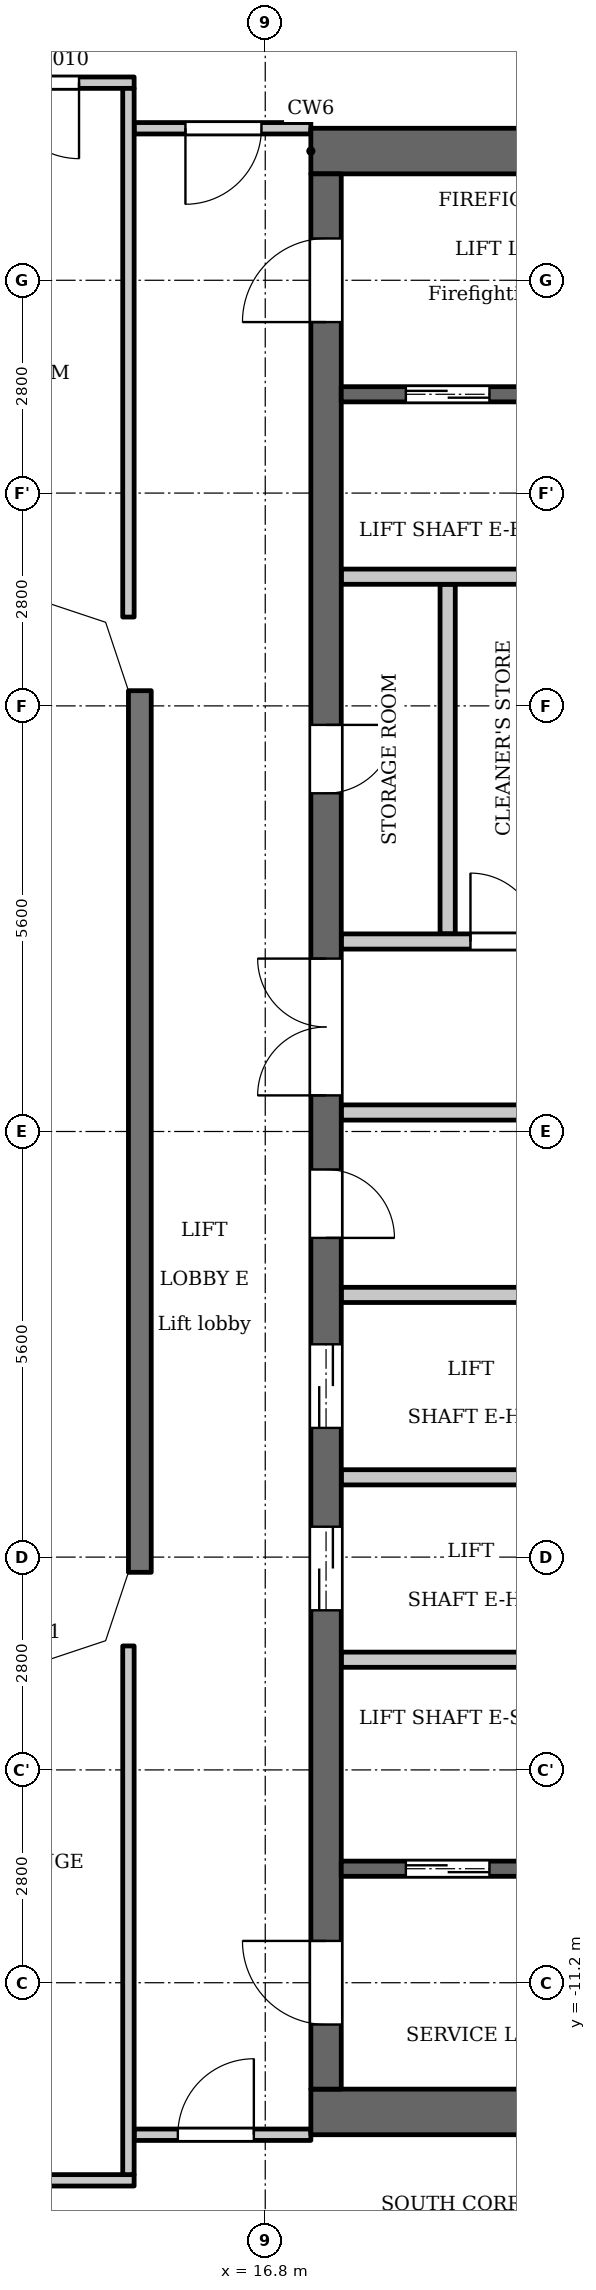
"""IFC4 building model, lengths in metres.
Left out: names, types, materials, properties, quantities, classifications, styles, units other than length and angle.
Written with IfcOpenShell. Run it as: python <this file> out.ifc"""

import sys

from ifc_helpers import new_model, si_unit, direction, frame, frame_2d, origin, place, context, subcontext, project, spatial, polyline, rectangle, outline, extrude, element, fill, save


model = new_model("IFC4")
c1 = context("Model", 3, precision=1e-05, world=origin(), true_north=direction((0.0, 1.0)))
c2 = subcontext(c1, "Body", "Model", "MODEL_VIEW")
j1 = project(units=[si_unit("LENGTHUNIT", "METRE"), si_unit("PLANEANGLEUNIT", "RADIAN")], contexts=[c1])
p1 = place(None, origin())
s1 = spatial("IfcSite", under=j1, at=p1, CompositionType="ELEMENT")
p2 = place(p1, origin())
s2 = spatial("IfcBuilding", under=s1, at=p2, CompositionType="ELEMENT")
p3 = place(p2, frame((0.0, 0.0, 252.2)))
s3 = spatial("IfcBuildingStorey", under=s2, at=p3, CompositionType="ELEMENT", Elevation=252.2)
p4 = place(p3, frame((15.15, 5.8, 0.0), z_axis=(0.0, 0.0, 1.0), x_axis=(0.0, -1.0, 0.0)))
e1 = element("IfcWall", 1, at=p4, inside=s3, PredefinedType="SOLIDWALL", context=c2, shape_type="SweptSolid", body=[
    extrude(rectangle(XDim=11.6, YDim=0.3, at=frame_2d((5.8, 0.0))), origin(), (0.0, 0.0, 1.0), 3.2),
])
for number, where, z_axis, x_axis in (
    (2, (17.4, 12.9, 0.0), (0.0, 0.0, 1.0), (1.0, 0.0, 0.0)),
    (3, (17.4, -12.9, 0.0), (0.0, 0.0, 1.0), (1.0, 0.0, 0.0)),
):
    element("IfcWall", number, at=place(p3, frame(where, z_axis=z_axis, x_axis=x_axis)), inside=s3, PredefinedType="SHEAR", context=c2, shape_type="SweptSolid", body=[
        extrude(rectangle(XDim=7.32, YDim=0.6, at=frame_2d((3.66, 0.0))), origin(), (0.0, 0.0, 1.0), 3.2),
    ])
p5 = place(p3, frame((19.2, 2.6, 0.0), z_axis=(0.0, 0.0, 1.0), x_axis=(0.0, 1.0, 0.0)))
e4 = element("IfcWall", 4, at=p5, inside=s3, PredefinedType="PARTITIONING", context=c2, shape_type="SweptSolid", body=[
    extrude(rectangle(XDim=4.6, YDim=0.2, at=frame_2d((2.3, 0.0))), origin(), (0.0, 0.0, 1.0), 3.2),
])
p6 = place(p3, frame((17.6, -12.6, 0.0), z_axis=(0.0, 0.0, 1.0), x_axis=(0.0, 1.0, 0.0)))
e5 = element("IfcWall", 5, at=p6, inside=s3, PredefinedType="SHEAR", context=c2, shape_type="SweptSolid", body=[
    extrude(rectangle(XDim=25.2, YDim=0.4, at=frame_2d((12.6, 0.0))), origin(), (0.0, 0.0, 1.0), 3.2),
])
p7 = place(p6, frame((6.3, 0.0, 0.0)))
e6 = element("IfcOpeningElement", 6, at=p7, cuts=e5, PredefinedType="OPENING", context=c2, shape_type="SweptSolid", body=[
    extrude(rectangle(XDim=1.1, YDim=2.1, at=frame_2d((0.55, 1.05))), frame((0.0, 0.21, 0.0), z_axis=(0.0, -1.0, 0.0), x_axis=(1.0, 0.0, 0.0)), (0.0, 0.0, 1.0), 0.42),
])
p8 = place(p6, frame((8.7, 0.0, 0.0)))
e7 = element("IfcOpeningElement", 7, at=p8, cuts=e5, PredefinedType="OPENING", context=c2, shape_type="SweptSolid", body=[
    extrude(rectangle(XDim=1.1, YDim=2.1, at=frame_2d((0.55, 1.05))), frame((0.0, 0.21, 0.0), z_axis=(0.0, -1.0, 0.0), x_axis=(1.0, 0.0, 0.0)), (0.0, 0.0, 1.0), 0.42),
])
p9 = place(p6, frame((11.2, 0.0, 0.0)))
e8 = element("IfcOpeningElement", 8, at=p9, cuts=e5, PredefinedType="OPENING", context=c2, shape_type="SweptSolid", body=[
    extrude(rectangle(XDim=0.9, YDim=2.1, at=frame_2d((0.45, 1.05))), frame((0.0, 0.21, 0.0), z_axis=(0.0, -1.0, 0.0), x_axis=(1.0, 0.0, 0.0)), (0.0, 0.0, 1.0), 0.42),
])
p10 = place(p6, frame((17.05, 0.0, 0.0)))
e9 = element("IfcOpeningElement", 9, at=p10, cuts=e5, PredefinedType="OPENING", context=c2, shape_type="SweptSolid", body=[
    extrude(rectangle(XDim=0.9, YDim=2.1, at=frame_2d((0.45, 1.05))), frame((0.0, 0.21, 0.0), z_axis=(0.0, -1.0, 0.0), x_axis=(1.0, 0.0, 0.0)), (0.0, 0.0, 1.0), 0.42),
])
p11 = place(p6, frame((23.25, 0.0, 0.0)))
e10 = element("IfcOpeningElement", 10, at=p11, cuts=e5, PredefinedType="OPENING", context=c2, shape_type="SweptSolid", body=[
    extrude(rectangle(XDim=1.1, YDim=2.1, at=frame_2d((0.55, 1.05))), frame((0.0, 0.21, 0.0), z_axis=(0.0, -1.0, 0.0), x_axis=(1.0, 0.0, 0.0)), (0.0, 0.0, 1.0), 0.42),
])
p12 = place(p6, frame((0.85, 0.0, 0.0)))
e11 = element("IfcOpeningElement", 11, at=p12, cuts=e5, PredefinedType="OPENING", context=c2, shape_type="SweptSolid", body=[
    extrude(rectangle(XDim=1.1, YDim=2.1, at=frame_2d((0.55, 1.05))), frame((0.0, 0.21, 0.0), z_axis=(0.0, -1.0, 0.0), x_axis=(1.0, 0.0, 0.0)), (0.0, 0.0, 1.0), 0.42),
])
p13 = place(p6, frame((13.075, 0.0, 0.0)))
e12 = element("IfcOpeningElement", 12, at=p13, cuts=e5, PredefinedType="OPENING", context=c2, shape_type="SweptSolid", body=[
    extrude(rectangle(XDim=1.8, YDim=2.1, at=frame_2d((0.9, 1.05))), frame((0.0, 0.21, 0.0), z_axis=(0.0, -1.0, 0.0), x_axis=(1.0, 0.0, 0.0)), (0.0, 0.0, 1.0), 0.42),
])
p14 = place(p3, frame((17.8, -9.7, 0.0), z_axis=(0.0, 0.0, 1.0), x_axis=(1.0, 0.0, 0.0)))
e13 = element("IfcWall", 13, at=p14, inside=s3, PredefinedType="SHEAR", context=c2, shape_type="SweptSolid", body=[
    extrude(rectangle(XDim=5.8, YDim=0.2, at=frame_2d((2.9, 0.0))), origin(), (0.0, 0.0, 1.0), 3.2),
])
p15 = place(p14, frame((0.85, 0.0, 0.0)))
e14 = element("IfcOpeningElement", 14, at=p15, cuts=e13, PredefinedType="OPENING", context=c2, shape_type="SweptSolid", body=[
    extrude(rectangle(XDim=1.1, YDim=2.1, at=frame_2d((0.55, 1.05))), frame((0.0, 0.11, 0.0), z_axis=(0.0, -1.0, 0.0), x_axis=(1.0, 0.0, 0.0)), (0.0, 0.0, 1.0), 0.22),
])
p16 = place(p14, frame((3.75, 0.0, 0.0)))
e15 = element("IfcOpeningElement", 15, at=p16, cuts=e13, PredefinedType="OPENING", context=c2, shape_type="SweptSolid", body=[
    extrude(rectangle(XDim=1.1, YDim=2.1, at=frame_2d((0.55, 1.05))), frame((0.0, 0.11, 0.0), z_axis=(0.0, -1.0, 0.0), x_axis=(1.0, 0.0, 0.0)), (0.0, 0.0, 1.0), 0.22),
])
for number, where, z_axis, x_axis in (
    (16, (17.8, -6.95, 0.0), (0.0, 0.0, 1.0), (1.0, 0.0, 0.0)),
    (17, (17.8, -4.55, 0.0), (0.0, 0.0, 1.0), (1.0, 0.0, 0.0)),
    (18, (17.8, -2.15, 0.0), (0.0, 0.0, 1.0), (1.0, 0.0, 0.0)),
):
    element("IfcWall", number, at=place(p3, frame(where, z_axis=z_axis, x_axis=x_axis)), inside=s3, PredefinedType="PARTITIONING", context=c2, shape_type="SweptSolid", body=[
        extrude(rectangle(XDim=2.8, YDim=0.2, at=frame_2d((1.4, 0.0))), origin(), (0.0, 0.0, 1.0), 3.2),
    ])
p17 = place(p3, frame((17.8, 0.25, 0.0), z_axis=(0.0, 0.0, 1.0), x_axis=(1.0, 0.0, 0.0)))
e19 = element("IfcWall", 19, at=p17, inside=s3, PredefinedType="PARTITIONING", context=c2, shape_type="SweptSolid", body=[
    extrude(rectangle(XDim=3.0, YDim=0.2, at=frame_2d((1.5, 0.0))), origin(), (0.0, 0.0, 1.0), 3.2),
])
p18 = place(p3, frame((17.8, 2.5, 0.0), z_axis=(0.0, 0.0, 1.0), x_axis=(1.0, 0.0, 0.0)))
e20 = element("IfcWall", 20, at=p18, inside=s3, PredefinedType="PARTITIONING", context=c2, shape_type="SweptSolid", body=[
    extrude(rectangle(XDim=3.0, YDim=0.2, at=frame_2d((1.5, 0.0))), origin(), (0.0, 0.0, 1.0), 3.2),
])
p19 = place(p18, frame((1.7, 0.0, 0.0)))
e21 = element("IfcOpeningElement", 21, at=p19, cuts=e20, PredefinedType="OPENING", context=c2, shape_type="SweptSolid", body=[
    extrude(rectangle(XDim=0.9, YDim=2.1, at=frame_2d((0.45, 1.05))), frame((0.0, 0.11, 0.0), z_axis=(0.0, -1.0, 0.0), x_axis=(1.0, 0.0, 0.0)), (0.0, 0.0, 1.0), 0.22),
])
p20 = place(p3, frame((17.8, 7.3, 0.0), z_axis=(0.0, 0.0, 1.0), x_axis=(1.0, 0.0, 0.0)))
e22 = element("IfcWall", 22, at=p20, inside=s3, PredefinedType="PARTITIONING", context=c2, shape_type="SweptSolid", body=[
    extrude(rectangle(XDim=2.8, YDim=0.2, at=frame_2d((1.4, 0.0))), origin(), (0.0, 0.0, 1.0), 3.2),
])
p21 = place(p3, frame((17.8, 9.7, 0.0), z_axis=(0.0, 0.0, 1.0), x_axis=(1.0, 0.0, 0.0)))
e23 = element("IfcWall", 23, at=p21, inside=s3, PredefinedType="SHEAR", context=c2, shape_type="SweptSolid", body=[
    extrude(rectangle(XDim=5.8, YDim=0.2, at=frame_2d((2.9, 0.0))), origin(), (0.0, 0.0, 1.0), 3.2),
])
p22 = place(p21, frame((0.85, 0.0, 0.0)))
e24 = element("IfcOpeningElement", 24, at=p22, cuts=e23, PredefinedType="OPENING", context=c2, shape_type="SweptSolid", body=[
    extrude(rectangle(XDim=1.1, YDim=2.1, at=frame_2d((0.55, 1.05))), frame((0.0, 0.11, 0.0), z_axis=(0.0, -1.0, 0.0), x_axis=(1.0, 0.0, 0.0)), (0.0, 0.0, 1.0), 0.22),
])
p23 = place(p21, frame((3.75, 0.0, 0.0)))
e25 = element("IfcOpeningElement", 25, at=p23, cuts=e23, PredefinedType="OPENING", context=c2, shape_type="SweptSolid", body=[
    extrude(rectangle(XDim=1.1, YDim=2.1, at=frame_2d((0.55, 1.05))), frame((0.0, 0.11, 0.0), z_axis=(0.0, -1.0, 0.0), x_axis=(1.0, 0.0, 0.0)), (0.0, 0.0, 1.0), 0.22),
])
p24 = place(p3, frame((-15.075, -13.8, 0.0), z_axis=(0.0, 0.0, 1.0), x_axis=(1.0, 0.0, 0.0)))
e26 = element("IfcWall", 26, at=p24, inside=s3, PredefinedType="PARTITIONING", context=c2, shape_type="SweptSolid", body=[
    extrude(rectangle(XDim=30.15, YDim=0.15, at=frame_2d((15.075, 0.0))), origin(), (0.0, 0.0, 1.0), 3.2),
])
p25 = place(p24, frame((2.225, 0.0, 0.0)))
e27 = element("IfcOpeningElement", 27, at=p25, cuts=e26, PredefinedType="OPENING", context=c2, shape_type="SweptSolid", body=[
    extrude(rectangle(XDim=1.0, YDim=2.1, at=frame_2d((0.5, 1.05))), frame((0.0, 0.085, 0.0), z_axis=(0.0, -1.0, 0.0), x_axis=(1.0, 0.0, 0.0)), (0.0, 0.0, 1.0), 0.17),
])
p26 = place(p24, frame((4.575, 0.0, 0.0)))
e28 = element("IfcOpeningElement", 28, at=p26, cuts=e26, PredefinedType="OPENING", context=c2, shape_type="SweptSolid", body=[
    extrude(rectangle(XDim=1.0, YDim=2.1, at=frame_2d((0.5, 1.05))), frame((0.0, 0.085, 0.0), z_axis=(0.0, -1.0, 0.0), x_axis=(1.0, 0.0, 0.0)), (0.0, 0.0, 1.0), 0.17),
])
p27 = place(p24, frame((13.425, 0.0, 0.0)))
e29 = element("IfcOpeningElement", 29, at=p27, cuts=e26, PredefinedType="OPENING", context=c2, shape_type="SweptSolid", body=[
    extrude(rectangle(XDim=1.0, YDim=2.1, at=frame_2d((0.5, 1.05))), frame((0.0, 0.085, 0.0), z_axis=(0.0, -1.0, 0.0), x_axis=(1.0, 0.0, 0.0)), (0.0, 0.0, 1.0), 0.17),
])
p28 = place(p24, frame((15.775, 0.0, 0.0)))
e30 = element("IfcOpeningElement", 30, at=p28, cuts=e26, PredefinedType="OPENING", context=c2, shape_type="SweptSolid", body=[
    extrude(rectangle(XDim=1.0, YDim=2.1, at=frame_2d((0.5, 1.05))), frame((0.0, 0.085, 0.0), z_axis=(0.0, -1.0, 0.0), x_axis=(1.0, 0.0, 0.0)), (0.0, 0.0, 1.0), 0.17),
])
p29 = place(p24, frame((24.625, 0.0, 0.0)))
e31 = element("IfcOpeningElement", 31, at=p29, cuts=e26, PredefinedType="OPENING", context=c2, shape_type="SweptSolid", body=[
    extrude(rectangle(XDim=1.0, YDim=2.1, at=frame_2d((0.5, 1.05))), frame((0.0, 0.085, 0.0), z_axis=(0.0, -1.0, 0.0), x_axis=(1.0, 0.0, 0.0)), (0.0, 0.0, 1.0), 0.17),
])
p30 = place(p24, frame((26.924, 0.0, 0.0)))
e32 = element("IfcOpeningElement", 32, at=p30, cuts=e26, PredefinedType="OPENING", context=c2, shape_type="SweptSolid", body=[
    extrude(rectangle(XDim=1.0, YDim=2.1, at=frame_2d((0.5, 1.05))), frame((0.0, 0.085, 0.0), z_axis=(0.0, -1.0, 0.0), x_axis=(1.0, 0.0, 0.0)), (0.0, 0.0, 1.0), 0.17),
])
p31 = place(p3, frame((15.075, -13.2, 0.0), z_axis=(0.0, 0.0, 1.0), x_axis=(1.0, 0.0, 0.0)))
e33 = element("IfcWall", 33, at=p31, inside=s3, PredefinedType="PARTITIONING", context=c2, shape_type="SweptSolid", body=[
    extrude(rectangle(XDim=2.325, YDim=0.15, at=frame_2d((1.163, 0.0))), origin(), (0.0, 0.0, 1.0), 3.2),
])
p32 = place(p31, frame((0.575, 0.0, 0.0)))
e34 = element("IfcOpeningElement", 34, at=p32, cuts=e33, PredefinedType="OPENING", context=c2, shape_type="SweptSolid", body=[
    extrude(rectangle(XDim=1.0, YDim=2.1, at=frame_2d((0.5, 1.05))), frame((0.0, 0.085, 0.0), z_axis=(0.0, -1.0, 0.0), x_axis=(1.0, 0.0, 0.0)), (0.0, 0.0, 1.0), 0.17),
])
p33 = place(p3, frame((15.075, 13.2, 0.0), z_axis=(0.0, 0.0, 1.0), x_axis=(1.0, 0.0, 0.0)))
e35 = element("IfcWall", 35, at=p33, inside=s3, PredefinedType="PARTITIONING", context=c2, shape_type="SweptSolid", body=[
    extrude(rectangle(XDim=2.325, YDim=0.15, at=frame_2d((1.163, 0.0))), origin(), (0.0, 0.0, 1.0), 3.2),
])
p34 = place(p33, frame((0.675, 0.0, 0.0)))
e36 = element("IfcOpeningElement", 36, at=p34, cuts=e35, PredefinedType="OPENING", context=c2, shape_type="SweptSolid", body=[
    extrude(rectangle(XDim=1.0, YDim=2.1, at=frame_2d((0.5, 1.05))), frame((0.0, 0.085, 0.0), z_axis=(0.0, -1.0, 0.0), x_axis=(1.0, 0.0, 0.0)), (0.0, 0.0, 1.0), 0.17),
])
p35 = place(p3, frame((-15.075, 13.8, 0.0), z_axis=(0.0, 0.0, 1.0), x_axis=(1.0, 0.0, 0.0)))
e37 = element("IfcWall", 37, at=p35, inside=s3, PredefinedType="PARTITIONING", context=c2, shape_type="SweptSolid", body=[
    extrude(rectangle(XDim=30.15, YDim=0.15, at=frame_2d((15.075, 0.0))), origin(), (0.0, 0.0, 1.0), 3.2),
])
p36 = place(p35, frame((0.726, 0.0, 0.0)))
e38 = element("IfcOpeningElement", 38, at=p36, cuts=e37, PredefinedType="OPENING", context=c2, shape_type="SweptSolid", body=[
    extrude(rectangle(XDim=1.0, YDim=2.1, at=frame_2d((0.5, 1.05))), frame((0.0, 0.085, 0.0), z_axis=(0.0, -1.0, 0.0), x_axis=(1.0, 0.0, 0.0)), (0.0, 0.0, 1.0), 0.17),
])
p37 = place(p35, frame((7.775, 0.0, 0.0)))
e39 = element("IfcOpeningElement", 39, at=p37, cuts=e37, PredefinedType="OPENING", context=c2, shape_type="SweptSolid", body=[
    extrude(rectangle(XDim=1.0, YDim=2.1, at=frame_2d((0.5, 1.05))), frame((0.0, 0.085, 0.0), z_axis=(0.0, -1.0, 0.0), x_axis=(1.0, 0.0, 0.0)), (0.0, 0.0, 1.0), 0.17),
])
p38 = place(p35, frame((10.125, 0.0, 0.0)))
e40 = element("IfcOpeningElement", 40, at=p38, cuts=e37, PredefinedType="OPENING", context=c2, shape_type="SweptSolid", body=[
    extrude(rectangle(XDim=1.0, YDim=2.1, at=frame_2d((0.5, 1.05))), frame((0.0, 0.085, 0.0), z_axis=(0.0, -1.0, 0.0), x_axis=(1.0, 0.0, 0.0)), (0.0, 0.0, 1.0), 0.17),
])
p39 = place(p35, frame((18.975, 0.0, 0.0)))
e41 = element("IfcOpeningElement", 41, at=p39, cuts=e37, PredefinedType="OPENING", context=c2, shape_type="SweptSolid", body=[
    extrude(rectangle(XDim=1.0, YDim=2.1, at=frame_2d((0.5, 1.05))), frame((0.0, 0.085, 0.0), z_axis=(0.0, -1.0, 0.0), x_axis=(1.0, 0.0, 0.0)), (0.0, 0.0, 1.0), 0.17),
])
p40 = place(p35, frame((21.325, 0.0, 0.0)))
e42 = element("IfcOpeningElement", 42, at=p40, cuts=e37, PredefinedType="OPENING", context=c2, shape_type="SweptSolid", body=[
    extrude(rectangle(XDim=1.0, YDim=2.1, at=frame_2d((0.5, 1.05))), frame((0.0, 0.085, 0.0), z_axis=(0.0, -1.0, 0.0), x_axis=(1.0, 0.0, 0.0)), (0.0, 0.0, 1.0), 0.17),
])
p41 = place(p35, frame((28.425, 0.0, 0.0)))
e43 = element("IfcOpeningElement", 43, at=p41, cuts=e37, PredefinedType="OPENING", context=c2, shape_type="SweptSolid", body=[
    extrude(rectangle(XDim=1.0, YDim=2.1, at=frame_2d((0.5, 1.05))), frame((0.0, 0.085, 0.0), z_axis=(0.0, -1.0, 0.0), x_axis=(1.0, 0.0, 0.0)), (0.0, 0.0, 1.0), 0.17),
])
for number, where, z_axis, x_axis in (
    (44, (15.0, -13.725, 0.0), (0.0, 0.0, 1.0), (0.0, 1.0, 0.0)),
    (45, (15.0, 6.769, 0.0), (0.0, 0.0, 1.0), (0.0, 1.0, 0.0)),
):
    element("IfcWall", number, at=place(p3, frame(where, z_axis=z_axis, x_axis=x_axis)), inside=s3, PredefinedType="PARTITIONING", context=c2, shape_type="SweptSolid", body=[
        extrude(rectangle(XDim=6.956, YDim=0.15, at=frame_2d((3.478, 0.0))), origin(), (0.0, 0.0, 1.0), 3.2),
    ])
p42 = place(p3, origin())
e46 = element("IfcWall", 46, at=p42, inside=s3, PredefinedType="SOLIDWALL", context=c2, shape_type="SweptSolid", body=[
    extrude(outline(polyline([(14.937, 6.937), (13.849, 7.3), (13.8, 7.3), (13.8, 7.0), (14.7, 6.7), (15.0, 5.8), (15.3, 5.8), (15.3, 5.849), (14.937, 6.937)])), origin(), (0.0, 0.0, 1.0), 3.2),
])
e47 = element("IfcWall", 47, at=p42, inside=s3, PredefinedType="SOLIDWALL", context=c2, shape_type="SweptSolid", body=[
    extrude(outline(polyline([(14.937, -6.937), (15.3, -5.849), (15.3, -5.8), (15.0, -5.8), (14.7, -6.7), (13.8, -7.0), (13.8, -7.3), (13.849, -7.3), (14.937, -6.937)])), origin(), (0.0, 0.0, 1.0), 3.2),
])
p43 = place(p15, origin())
e48 = element("IfcDoor", 48, at=p43, inside=s3, OperationType="DOUBLE_DOOR_SLIDING", PredefinedType="DOOR", context=c2, shape_type="SweptSolid", body=[
    extrude(rectangle(XDim=1.1, YDim=2.1, at=frame_2d((0.55, 1.05))), frame((0.0, 0.025, 0.0), z_axis=(0.0, -1.0, 0.0), x_axis=(1.0, 0.0, 0.0)), (0.0, 0.0, 1.0), 0.05),
])
fill(e14, e48)
p44 = place(p7, origin())
e49 = element("IfcDoor", 49, at=p44, inside=s3, OperationType="DOUBLE_DOOR_SLIDING", PredefinedType="DOOR", context=c2, shape_type="SweptSolid", body=[
    extrude(rectangle(XDim=1.1, YDim=2.1, at=frame_2d((0.55, 1.05))), frame((0.0, 0.025, 0.0), z_axis=(0.0, -1.0, 0.0), x_axis=(1.0, 0.0, 0.0)), (0.0, 0.0, 1.0), 0.05),
])
fill(e6, e49)
p45 = place(p8, origin())
e50 = element("IfcDoor", 50, at=p45, inside=s3, OperationType="DOUBLE_DOOR_SLIDING", PredefinedType="DOOR", context=c2, shape_type="SweptSolid", body=[
    extrude(rectangle(XDim=1.1, YDim=2.1, at=frame_2d((0.55, 1.05))), frame((0.0, 0.025, 0.0), z_axis=(0.0, -1.0, 0.0), x_axis=(1.0, 0.0, 0.0)), (0.0, 0.0, 1.0), 0.05),
])
fill(e7, e50)
p46 = place(p9, origin())
e51 = element("IfcDoor", 51, at=p46, inside=s3, OperationType="SINGLE_SWING_LEFT", PredefinedType="DOOR", context=c2, shape_type="SweptSolid", body=[
    extrude(rectangle(XDim=0.9, YDim=2.1, at=frame_2d((0.45, 1.05))), frame((0.0, 0.025, 0.0), z_axis=(0.0, -1.0, 0.0), x_axis=(1.0, 0.0, 0.0)), (0.0, 0.0, 1.0), 0.05),
])
fill(e8, e51)
p47 = place(p10, origin())
e52 = element("IfcDoor", 52, at=p47, inside=s3, OperationType="SINGLE_SWING_RIGHT", PredefinedType="DOOR", context=c2, shape_type="SweptSolid", body=[
    extrude(rectangle(XDim=0.9, YDim=2.1, at=frame_2d((0.45, 1.05))), frame((0.0, 0.025, 0.0), z_axis=(0.0, -1.0, 0.0), x_axis=(1.0, 0.0, 0.0)), (0.0, 0.0, 1.0), 0.05),
])
fill(e9, e52)
p48 = place(p19, origin())
e53 = element("IfcDoor", 53, at=p48, inside=s3, OperationType="SINGLE_SWING_RIGHT", PredefinedType="DOOR", context=c2, shape_type="SweptSolid", body=[
    extrude(rectangle(XDim=0.9, YDim=2.1, at=frame_2d((0.45, 1.05))), frame((0.0, 0.025, 0.0), z_axis=(0.0, -1.0, 0.0), x_axis=(1.0, 0.0, 0.0)), (0.0, 0.0, 1.0), 0.05),
])
fill(e21, e53)
p49 = place(p22, origin())
e54 = element("IfcDoor", 54, at=p49, inside=s3, OperationType="DOUBLE_DOOR_SLIDING", PredefinedType="DOOR", context=c2, shape_type="SweptSolid", body=[
    extrude(rectangle(XDim=1.1, YDim=2.1, at=frame_2d((0.55, 1.05))), frame((0.0, 0.025, 0.0), z_axis=(0.0, -1.0, 0.0), x_axis=(1.0, 0.0, 0.0)), (0.0, 0.0, 1.0), 0.05),
])
fill(e24, e54)
p50 = place(p11, origin())
e55 = element("IfcDoor", 55, at=p50, inside=s3, OperationType="SINGLE_SWING_RIGHT", PredefinedType="DOOR", context=c2, shape_type="SweptSolid", body=[
    extrude(rectangle(XDim=1.1, YDim=2.1, at=frame_2d((0.55, 1.05))), frame((0.0, 0.025, 0.0), z_axis=(0.0, -1.0, 0.0), x_axis=(1.0, 0.0, 0.0)), (0.0, 0.0, 1.0), 0.05),
])
fill(e10, e55)
p51 = place(p12, origin())
e56 = element("IfcDoor", 56, at=p51, inside=s3, OperationType="SINGLE_SWING_LEFT", PredefinedType="DOOR", context=c2, shape_type="SweptSolid", body=[
    extrude(rectangle(XDim=1.1, YDim=2.1, at=frame_2d((0.55, 1.05))), frame((0.0, 0.025, 0.0), z_axis=(0.0, -1.0, 0.0), x_axis=(1.0, 0.0, 0.0)), (0.0, 0.0, 1.0), 0.05),
])
fill(e11, e56)
p52 = place(p13, origin())
e57 = element("IfcDoor", 57, at=p52, inside=s3, OperationType="DOUBLE_DOOR_SINGLE_SWING", PredefinedType="DOOR", context=c2, shape_type="SweptSolid", body=[
    extrude(rectangle(XDim=1.8, YDim=2.1, at=frame_2d((0.9, 1.05))), frame((0.0, 0.025, 0.0), z_axis=(0.0, -1.0, 0.0), x_axis=(1.0, 0.0, 0.0)), (0.0, 0.0, 1.0), 0.05),
])
fill(e12, e57)
p53 = place(p34, origin())
e58 = element("IfcDoor", 58, at=p53, inside=s3, OperationType="SINGLE_SWING_LEFT", PredefinedType="DOOR", context=c2, shape_type="SweptSolid", body=[
    extrude(rectangle(XDim=1.0, YDim=2.1, at=frame_2d((0.5, 1.05))), frame((0.0, 0.025, 0.0), z_axis=(0.0, -1.0, 0.0), x_axis=(1.0, 0.0, 0.0)), (0.0, 0.0, 1.0), 0.05),
])
fill(e36, e58)
p54 = place(p32, origin())
e59 = element("IfcDoor", 59, at=p54, inside=s3, OperationType="SINGLE_SWING_LEFT", PredefinedType="DOOR", context=c2, shape_type="SweptSolid", body=[
    extrude(rectangle(XDim=1.0, YDim=2.1, at=frame_2d((0.5, 1.05))), frame((0.0, 0.025, 0.0), z_axis=(0.0, -1.0, 0.0), x_axis=(1.0, 0.0, 0.0)), (0.0, 0.0, 1.0), 0.05),
])
fill(e34, e59)
p55 = place(p41, origin())
e60 = element("IfcDoor", 60, at=p55, inside=s3, OperationType="SINGLE_SWING_RIGHT", PredefinedType="DOOR", context=c2, shape_type="SweptSolid", body=[
    extrude(rectangle(XDim=1.0, YDim=2.1, at=frame_2d((0.5, 1.05))), frame((0.0, 0.025, 0.0), z_axis=(0.0, -1.0, 0.0), x_axis=(1.0, 0.0, 0.0)), (0.0, 0.0, 1.0), 0.05),
])
fill(e43, e60)
save(model, sys.argv[1])
